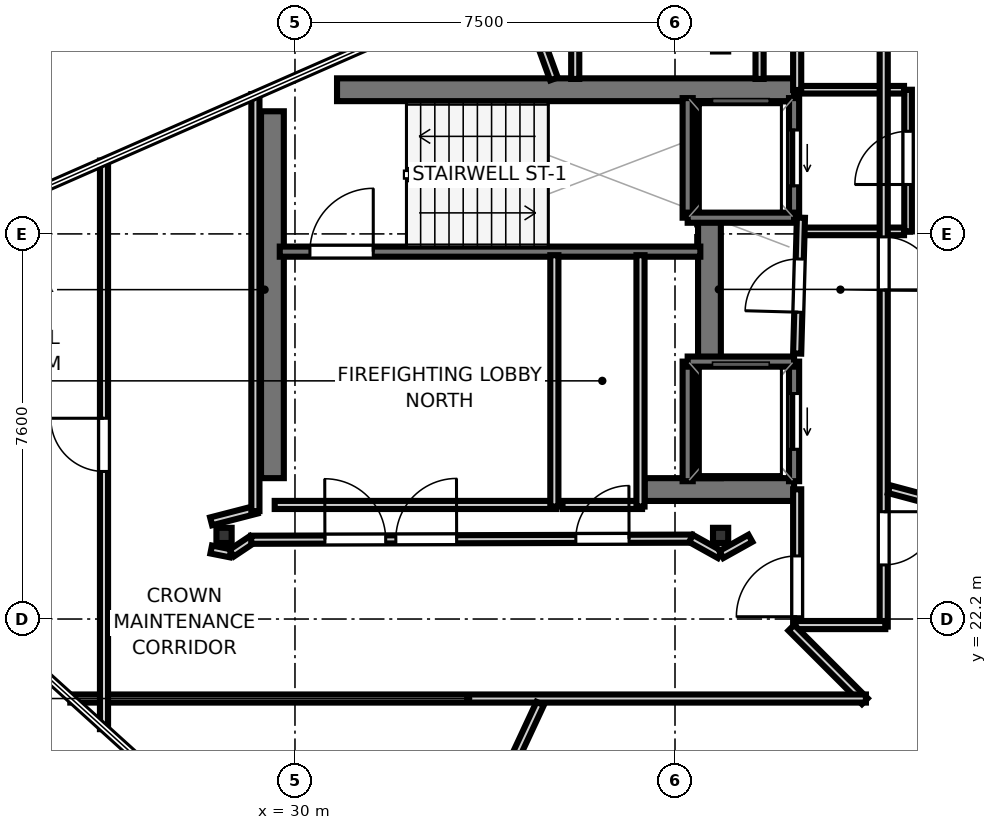
"""IFC4 building model, lengths in metres.
Left out: names, types, materials, properties, quantities, classifications, styles, units other than length and angle.
Written with IfcOpenShell. Run it as: python <this file> out.ifc"""

import sys

from ifc_helpers import new_model, si_unit, direction, frame, frame_2d, origin, origin_2d, place, context, subcontext, project, spatial, rectangle, i_section, extrude, element, fill, save


model = new_model("IFC4")
c1 = context("Model", 3, precision=1e-05, world=origin(), true_north=direction((0.0, 1.0)))
c2 = subcontext(c1, "Body", "Model", "MODEL_VIEW")
j1 = project(units=[si_unit("LENGTHUNIT", "METRE"), si_unit("PLANEANGLEUNIT", "RADIAN")], contexts=[c1])
p1 = place(None, origin())
s1 = spatial("IfcSite", under=j1, at=p1, CompositionType="ELEMENT")
p2 = place(p1, origin())
s2 = spatial("IfcBuilding", under=s1, at=p2, CompositionType="ELEMENT")
p3 = place(p2, frame((0.0, 0.0, 371.3)))
s3 = spatial("IfcBuildingStorey", under=s2, at=p3, CompositionType="ELEMENT", Elevation=371.3)
p4 = place(p3, frame((30.83, 32.645, 0.0), z_axis=(0.0, 0.0, 1.0), x_axis=(1.0, 0.0, 0.0)))
e1 = element("IfcWall", 1, at=p4, inside=s3, PredefinedType="SHEAR", context=c2, shape_type="SweptSolid", body=[
    extrude(rectangle(XDim=9.02, YDim=0.45, at=frame_2d((4.51, 0.0))), origin(), (0.0, 0.0, 1.0), 3.55),
])
p5 = place(p3, frame((36.9, 24.755, 0.0), z_axis=(0.0, 0.0, 1.0), x_axis=(1.0, 0.0, 0.0)))
e2 = element("IfcWall", 2, at=p5, inside=s3, PredefinedType="SHEAR", context=c2, shape_type="SweptSolid", body=[
    extrude(rectangle(XDim=2.95, YDim=0.45, at=frame_2d((1.475, 0.0))), origin(), (0.0, 0.0, 1.0), 3.55),
])
p6 = place(p3, frame((29.555, 24.98, 0.0), z_axis=(0.0, 0.0, 1.0), x_axis=(0.0, 1.0, 0.0)))
e3 = element("IfcWall", 3, at=p6, inside=s3, PredefinedType="SHEAR", context=c2, shape_type="SweptSolid", body=[
    extrude(rectangle(XDim=7.24, YDim=0.45, at=frame_2d((3.62, 0.0))), origin(), (0.0, 0.0, 1.0), 3.55),
])
p7 = place(p3, frame((38.18, 24.98, 0.0), z_axis=(0.0, 0.0, 1.0), x_axis=(0.0, 1.0, 0.0)))
e4 = element("IfcWall", 4, at=p7, inside=s3, PredefinedType="SHEAR", context=c2, shape_type="SweptSolid", body=[
    extrude(rectangle(XDim=7.44, YDim=0.45, at=frame_2d((3.72, 0.0))), origin(), (0.0, 0.0, 1.0), 3.55),
])
for number, where, z_axis, x_axis in (
    (5, (28.6, 23.85, 0.0), (0.0, 0.0, 1.0), (1.0, 0.0, 0.0)),
    (6, (38.4, 23.85, 0.0), (0.0, 0.0, 1.0), (1.0, 0.0, 0.0)),
):
    element("IfcColumn", number, at=place(p3, frame(where, z_axis=z_axis, x_axis=x_axis)), inside=s3, PredefinedType="COLUMN", context=c2, shape_type="SweptSolid", body=[
        extrude(i_section(OverallWidth=0.3, OverallDepth=0.3, WebThickness=0.01, FlangeThickness=0.015, at=origin_2d()), origin(), (0.0, 0.0, 1.0), 3.75),
    ])
p8 = place(p3, frame((29.7, 29.45, 0.0), z_axis=(0.0, 0.0, 1.0), x_axis=(1.0, 0.0, 0.0)))
e7 = element("IfcWall", 7, at=p8, inside=s3, PredefinedType="SOLIDWALL", context=c2, shape_type="SweptSolid", body=[
    extrude(rectangle(XDim=8.3, YDim=0.2, at=frame_2d((4.15, 0.0))), origin(), (0.0, 0.0, 1.0), 3.55),
])
p9 = place(p8, frame((0.595, 0.0, 0.0)))
e8 = element("IfcOpeningElement", 8, at=p9, cuts=e7, PredefinedType="OPENING", context=c2, shape_type="SweptSolid", body=[
    extrude(rectangle(XDim=1.25, YDim=2.15, at=frame_2d((0.625, 1.075))), frame((0.0, 0.11, 0.0), z_axis=(0.0, -1.0, 0.0), x_axis=(1.0, 0.0, 0.0)), (0.0, 0.0, 1.0), 0.22),
])
p10 = place(p3, frame((39.85, 30.12, 0.0), z_axis=(0.0, 0.0, 1.0), x_axis=(0.0, 1.0, 0.0)))
e9 = element("IfcWall", 9, at=p10, inside=s3, PredefinedType="SOLIDWALL", context=c2, shape_type="SweptSolid", body=[
    extrude(rectangle(XDim=2.36, YDim=0.2, at=frame_2d((1.18, 0.0))), origin(), (0.0, 0.0, 1.0), 3.55),
])
p11 = place(p10, frame((0.63, 0.0, 0.0)))
e10 = element("IfcOpeningElement", 10, at=p11, cuts=e9, PredefinedType="OPENING", context=c2, shape_type="SweptSolid", body=[
    extrude(rectangle(XDim=1.1, YDim=2.15, at=frame_2d((0.55, 1.075))), frame((0.0, 0.11, 0.0), z_axis=(0.0, -1.0, 0.0), x_axis=(1.0, 0.0, 0.0)), (0.0, 0.0, 1.0), 0.22),
])
p12 = place(p3, frame((37.75, 30.12, 0.0), z_axis=(0.0, 0.0, 1.0), x_axis=(0.0, 1.0, 0.0)))
e11 = element("IfcWall", 11, at=p12, inside=s3, PredefinedType="SOLIDWALL", context=c2, shape_type="SweptSolid", body=[
    extrude(rectangle(XDim=2.36, YDim=0.2, at=frame_2d((1.18, 0.0))), origin(), (0.0, 0.0, 1.0), 3.55),
])
p13 = place(p3, frame((37.75, 30.12, 0.0), z_axis=(0.0, 0.0, 1.0), x_axis=(1.0, 0.0, 0.0)))
e12 = element("IfcWall", 12, at=p13, inside=s3, PredefinedType="SOLIDWALL", context=c2, shape_type="SweptSolid", body=[
    extrude(rectangle(XDim=2.1, YDim=0.2, at=frame_2d((1.05, 0.0))), origin(), (0.0, 0.0, 1.0), 3.55),
])
p14 = place(p3, frame((39.85, 24.92, 0.0), z_axis=(0.0, 0.0, 1.0), x_axis=(0.0, 1.0, 0.0)))
e13 = element("IfcWall", 13, at=p14, inside=s3, PredefinedType="SOLIDWALL", context=c2, shape_type="SweptSolid", body=[
    extrude(rectangle(XDim=2.36, YDim=0.2, at=frame_2d((1.18, 0.0))), origin(), (0.0, 0.0, 1.0), 3.55),
])
p15 = place(p14, frame((0.63, 0.0, 0.0)))
e14 = element("IfcOpeningElement", 14, at=p15, cuts=e13, PredefinedType="OPENING", context=c2, shape_type="SweptSolid", body=[
    extrude(rectangle(XDim=1.1, YDim=2.15, at=frame_2d((0.55, 1.075))), frame((0.0, 0.11, 0.0), z_axis=(0.0, -1.0, 0.0), x_axis=(1.0, 0.0, 0.0)), (0.0, 0.0, 1.0), 0.22),
])
p16 = place(p3, frame((37.75, 24.92, 0.0), z_axis=(0.0, 0.0, 1.0), x_axis=(0.0, 1.0, 0.0)))
e15 = element("IfcWall", 15, at=p16, inside=s3, PredefinedType="SOLIDWALL", context=c2, shape_type="SweptSolid", body=[
    extrude(rectangle(XDim=2.36, YDim=0.2, at=frame_2d((1.18, 0.0))), origin(), (0.0, 0.0, 1.0), 3.55),
])
p17 = place(p3, frame((37.75, 27.28, 0.0), z_axis=(0.0, 0.0, 1.0), x_axis=(1.0, 0.0, 0.0)))
e16 = element("IfcWall", 16, at=p17, inside=s3, PredefinedType="SOLIDWALL", context=c2, shape_type="SweptSolid", body=[
    extrude(rectangle(XDim=2.1, YDim=0.2, at=frame_2d((1.05, 0.0))), origin(), (0.0, 0.0, 1.0), 3.55),
])
p18 = place(p3, frame((42.1, 29.85, 0.0), z_axis=(0.0, 0.0, 1.0), x_axis=(0.0, 1.0, 0.0)))
e17 = element("IfcWall", 17, at=p18, inside=s3, PredefinedType="PARTITIONING", context=c2, shape_type="SweptSolid", body=[
    extrude(rectangle(XDim=2.795, YDim=0.15, at=frame_2d((1.397, 0.0))), origin(), (0.0, 0.0, 1.0), 2.87),
])
p19 = place(p18, frame((0.925, 0.0, 0.0)))
e18 = element("IfcOpeningElement", 18, at=p19, cuts=e17, PredefinedType="OPENING", context=c2, shape_type="SweptSolid", body=[
    extrude(rectangle(XDim=1.05, YDim=2.15, at=frame_2d((0.525, 1.075))), frame((0.0, 0.085, 0.0), z_axis=(0.0, -1.0, 0.0), x_axis=(1.0, 0.0, 0.0)), (0.0, 0.0, 1.0), 0.17),
])
for number, where, z_axis, x_axis in (
    (19, (39.96, 29.85, 0.0), (0.0, 0.0, 1.0), (1.0, 0.0, 0.0)),
    (20, (39.96, 32.645, 0.0), (0.0, 0.0, 1.0), (1.0, 0.0, 0.0)),
):
    element("IfcWall", number, at=place(p3, frame(where, z_axis=z_axis, x_axis=x_axis)), inside=s3, PredefinedType="PARTITIONING", context=c2, shape_type="SweptSolid", body=[
        extrude(rectangle(XDim=2.06, YDim=0.15, at=frame_2d((1.03, 0.0))), origin(), (0.0, 0.0, 1.0), 2.87),
    ])
p20 = place(p3, frame((35.15, 24.451, 0.0), z_axis=(0.0, 0.0, 1.0), x_axis=(-1.0, 0.0, 0.0)))
e21 = element("IfcWall", 21, at=p20, inside=s3, PredefinedType="PARTITIONING", context=c2, shape_type="SweptSolid", body=[
    extrude(rectangle(XDim=5.55, YDim=0.16, at=frame_2d((2.775, 0.0))), origin(), (0.0, 0.0, 1.0), 2.87),
])
p21 = place(p3, frame((35.119, 29.38, 0.0), z_axis=(0.0, 0.0, 1.0), x_axis=(0.0, -1.0, 0.0)))
e22 = element("IfcWall", 22, at=p21, inside=s3, PredefinedType="PARTITIONING", context=c2, shape_type="SweptSolid", body=[
    extrude(rectangle(XDim=4.96, YDim=0.16, at=frame_2d((2.48, 0.0))), origin(), (0.0, 0.0, 1.0), 2.08),
])
p22 = place(p3, frame((39.911, 22.05, 0.0), z_axis=(0.0, 0.0, 1.0), x_axis=(0.0, 1.0, 0.0)))
e23 = element("IfcWall", 23, at=p22, inside=s3, PredefinedType="PARTITIONING", context=c2, shape_type="SweptSolid", body=[
    extrude(rectangle(XDim=2.71, YDim=0.16, at=frame_2d((1.355, 0.0))), origin(), (0.0, 0.0, 1.0), 2.87),
])
p23 = place(p22, frame((0.195, 0.0, 0.0)))
e24 = element("IfcOpeningElement", 24, at=p23, cuts=e23, PredefinedType="OPENING", context=c2, shape_type="SweptSolid", body=[
    extrude(rectangle(XDim=1.2, YDim=2.15, at=frame_2d((0.6, 1.075))), frame((0.0, 0.09, 0.0), z_axis=(0.0, -1.0, 0.0), x_axis=(1.0, 0.0, 0.0)), (0.0, 0.0, 1.0), 0.18),
])
p24 = place(p3, frame((39.911, 27.439, 0.0), z_axis=(0.0, 0.0, 1.0), x_axis=(0.027673579092, 0.999617013171, 0.0)))
e25 = element("IfcWall", 25, at=p24, inside=s3, PredefinedType="PARTITIONING", context=c2, shape_type="SweptSolid", body=[
    extrude(rectangle(XDim=2.682, YDim=0.16, at=frame_2d((1.341, 0.0))), origin(), (0.0, 0.0, 1.0), 2.87),
])
p25 = place(p24, frame((0.816, 0.0, 0.0)))
e26 = element("IfcOpeningElement", 26, at=p25, cuts=e25, PredefinedType="OPENING", context=c2, shape_type="SweptSolid", body=[
    extrude(rectangle(XDim=1.05, YDim=2.15, at=frame_2d((0.525, 1.075))), frame((0.0, 0.09, 0.0), z_axis=(0.0, -1.0, 0.0), x_axis=(1.0, 0.0, 0.0)), (0.0, 0.0, 1.0), 0.18),
])
p26 = place(p3, frame((39.911, 32.64, 0.0), z_axis=(0.0, 0.0, 1.0), x_axis=(0.0, 1.0, 0.0)))
e27 = element("IfcWall", 27, at=p26, inside=s3, PredefinedType="PARTITIONING", context=c2, shape_type="SweptSolid", body=[
    extrude(rectangle(XDim=2.16, YDim=0.16, at=frame_2d((1.08, 0.0))), origin(), (0.0, 0.0, 1.0), 2.87),
])
p27 = place(p3, frame((41.619, 34.8, 0.0), z_axis=(0.0, 0.0, 1.0), x_axis=(0.0, -1.0, 0.0)))
e28 = element("IfcWall", 28, at=p27, inside=s3, PredefinedType="PARTITIONING", context=c2, shape_type="SweptSolid", body=[
    extrude(rectangle(XDim=12.75, YDim=0.16, at=frame_2d((6.375, 0.0))), origin(), (0.0, 0.0, 1.0), 2.87),
])
p28 = place(p27, frame((10.482, 0.0, 0.0)))
e29 = element("IfcOpeningElement", 29, at=p28, cuts=e28, PredefinedType="OPENING", context=c2, shape_type="SweptSolid", body=[
    extrude(rectangle(XDim=1.05, YDim=2.15, at=frame_2d((0.525, 1.075))), frame((0.0, 0.09, 0.0), z_axis=(0.0, -1.0, 0.0), x_axis=(1.0, 0.0, 0.0)), (0.0, 0.0, 1.0), 0.18),
])
p29 = place(p27, frame((5.059, 0.0, 0.0)))
e30 = element("IfcOpeningElement", 30, at=p29, cuts=e28, PredefinedType="OPENING", context=c2, shape_type="SweptSolid", body=[
    extrude(rectangle(XDim=1.05, YDim=2.15, at=frame_2d((0.525, 1.075))), frame((0.0, 0.09, 0.0), z_axis=(0.0, -1.0, 0.0), x_axis=(1.0, 0.0, 0.0)), (0.0, 0.0, 1.0), 0.18),
])
p30 = place(p3, frame((41.65, 22.081, 0.0), z_axis=(0.0, 0.0, 1.0), x_axis=(-1.0, 0.0, 0.0)))
e31 = element("IfcWall", 31, at=p30, inside=s3, PredefinedType="PARTITIONING", context=c2, shape_type="SweptSolid", body=[
    extrude(rectangle(XDim=1.77, YDim=0.16, at=frame_2d((0.885, 0.0))), origin(), (0.0, 0.0, 1.0), 2.87),
])
p31 = place(p3, frame((36.85, 24.451, 0.0), z_axis=(0.0, 0.0, 1.0), x_axis=(-1.0, 0.0, 0.0)))
e32 = element("IfcWall", 32, at=p31, inside=s3, PredefinedType="PARTITIONING", context=c2, shape_type="SweptSolid", body=[
    extrude(rectangle(XDim=1.57, YDim=0.16, at=frame_2d((0.785, 0.0))), origin(), (0.0, 0.0, 1.0), 2.87),
])
p32 = place(p3, frame((36.819, 29.38, 0.0), z_axis=(0.0, 0.0, 1.0), x_axis=(0.0, -1.0, 0.0)))
e33 = element("IfcWall", 33, at=p32, inside=s3, PredefinedType="PARTITIONING", context=c2, shape_type="SweptSolid", body=[
    extrude(rectangle(XDim=4.96, YDim=0.16, at=frame_2d((2.48, 0.0))), origin(), (0.0, 0.0, 1.0), 2.87),
])
p33 = place(p3, frame((35.531, 32.858, 0.0), z_axis=(0.0, 0.0, 1.0), x_axis=(0.0, 1.0, 0.0)))
e34 = element("IfcWall", 34, at=p33, inside=s3, PredefinedType="PARTITIONING", context=c2, shape_type="SweptSolid", body=[
    extrude(rectangle(XDim=2.474, YDim=0.16, at=frame_2d((1.237, 0.0))), origin(), (0.0, 0.0, 1.0), 2.87),
])
p34 = place(p3, frame((39.169, 35.1, 0.0), z_axis=(0.0, 0.0, 1.0), x_axis=(0.0, -1.0, 0.0)))
e35 = element("IfcWall", 35, at=p34, inside=s3, PredefinedType="PARTITIONING", context=c2, shape_type="SweptSolid", body=[
    extrude(rectangle(XDim=2.242, YDim=0.16, at=frame_2d((1.121, 0.0))), origin(), (0.0, 0.0, 1.0), 2.87),
])
p35 = place(p3, frame((29.242, 24.359, 0.0), z_axis=(0.0, 0.0, 1.0), x_axis=(-0.968190928123, -0.250212563035, 0.0)))
e36 = element("IfcWall", 36, at=p35, inside=s3, PredefinedType="PARTITIONING", context=c2, shape_type="SweptSolid", body=[
    extrude(rectangle(XDim=0.927, YDim=0.16, at=frame_2d((0.463, 0.0))), origin(), (0.0, 0.0, 1.0), 2.87),
])
p36 = place(p3, frame((28.346, 23.572, 0.0), z_axis=(0.0, 0.0, 1.0), x_axis=(0.980749356168, -0.19527083852, 0.0)))
e37 = element("IfcWall", 37, at=p36, inside=s3, PredefinedType="PARTITIONING", context=c2, shape_type="SweptSolid", body=[
    extrude(rectangle(XDim=0.389, YDim=0.16, at=frame_2d((0.194, 0.0))), origin(), (0.0, 0.0, 1.0), 2.87),
])
p37 = place(p3, frame((28.751, 23.501, 0.0), z_axis=(0.0, 0.0, 1.0), x_axis=(0.831506528289, 0.555514980368, 0.0)))
e38 = element("IfcWall", 38, at=p37, inside=s3, PredefinedType="PARTITIONING", context=c2, shape_type="SweptSolid", body=[
    extrude(rectangle(XDim=0.484, YDim=0.16, at=frame_2d((0.242, 0.0))), origin(), (0.0, 0.0, 1.0), 2.87),
])
p38 = place(p3, frame((29.136, 23.764, 0.0), z_axis=(0.0, 0.0, 1.0), x_axis=(0.999996877471, 0.002499009437, 0.0)))
e39 = element("IfcWall", 39, at=p38, inside=s3, PredefinedType="PARTITIONING", context=c2, shape_type="SweptSolid", body=[
    extrude(rectangle(XDim=8.695, YDim=0.16, at=frame_2d((4.347, 0.0))), origin(), (0.0, 0.0, 1.0), 2.87),
])
p39 = place(p38, frame((2.854, 0.0, 0.0)))
e40 = element("IfcOpeningElement", 40, at=p39, cuts=e39, PredefinedType="OPENING", context=c2, shape_type="SweptSolid", body=[
    extrude(rectangle(XDim=1.2, YDim=2.15, at=frame_2d((0.6, 1.075))), frame((0.0, 0.09, 0.0), z_axis=(0.0, -1.0, 0.0), x_axis=(1.0, 0.0, 0.0)), (0.0, 0.0, 1.0), 0.18),
])
p40 = place(p38, frame((6.407, 0.0, 0.0)))
e41 = element("IfcOpeningElement", 41, at=p40, cuts=e39, PredefinedType="OPENING", context=c2, shape_type="SweptSolid", body=[
    extrude(rectangle(XDim=1.05, YDim=2.15, at=frame_2d((0.525, 1.075))), frame((0.0, 0.09, 0.0), z_axis=(0.0, -1.0, 0.0), x_axis=(1.0, 0.0, 0.0)), (0.0, 0.0, 1.0), 0.18),
])
p41 = place(p38, frame((1.454, 0.0, 0.0)))
e42 = element("IfcOpeningElement", 42, at=p41, cuts=e39, PredefinedType="OPENING", context=c2, shape_type="SweptSolid", body=[
    extrude(rectangle(XDim=1.2, YDim=2.15, at=frame_2d((0.6, 1.075))), frame((0.0, 0.09, 0.0), z_axis=(0.0, -1.0, 0.0), x_axis=(1.0, 0.0, 0.0)), (0.0, 0.0, 1.0), 0.18),
])
p42 = place(p3, frame((37.816, 23.79, 0.0), z_axis=(0.0, 0.0, 1.0), x_axis=(0.873431330758, -0.486947338478, 0.0)))
e43 = element("IfcWall", 43, at=p42, inside=s3, PredefinedType="PARTITIONING", context=c2, shape_type="SweptSolid", body=[
    extrude(rectangle(XDim=0.651, YDim=0.16, at=frame_2d((0.326, 0.0))), origin(), (0.0, 0.0, 1.0), 2.87),
])
p43 = place(p3, frame((38.415, 23.473, 0.0), z_axis=(0.0, 0.0, 1.0), x_axis=(0.873120406102, 0.487504621976, 0.0)))
e44 = element("IfcWall", 44, at=p43, inside=s3, PredefinedType="PARTITIONING", context=c2, shape_type="SweptSolid", body=[
    extrude(rectangle(XDim=0.656, YDim=0.16, at=frame_2d((0.328, 0.0))), origin(), (0.0, 0.0, 1.0), 2.87),
])
p44 = place(p3, frame((39.796, 22.028, 0.0), z_axis=(0.0, 0.0, 1.0), x_axis=(0.707106781187, -0.707106781187, 0.0)))
e45 = element("IfcWall", 45, at=p44, inside=s3, PredefinedType="PARTITIONING", context=c2, shape_type="SweptSolid", body=[
    extrude(rectangle(XDim=2.051, YDim=0.16, at=frame_2d((1.025, 0.0))), origin(), (0.0, 0.0, 1.0), 2.87),
])
p45 = place(p3, frame((41.268, 20.631, 0.0), z_axis=(0.0, 0.0, 1.0), x_axis=(-1.0, 0.0, 0.0)))
e46 = element("IfcWall", 46, at=p45, inside=s3, PredefinedType="PARTITIONING", context=c2, shape_type="SweptSolid", body=[
    extrude(rectangle(XDim=15.702, YDim=0.16, at=frame_2d((7.851, 0.0))), origin(), (0.0, 0.0, 1.0), 2.87),
])
p46 = place(p3, frame((26.231, 20.027, 0.0), z_axis=(0.0, 0.0, 1.0), x_axis=(0.0, 1.0, 0.0)))
e47 = element("IfcWall", 47, at=p46, inside=s3, PredefinedType="PARTITIONING", context=c2, shape_type="SweptSolid", body=[
    extrude(rectangle(XDim=11.22, YDim=0.16, at=frame_2d((5.61, 0.0))), origin(), (0.0, 0.0, 1.0), 2.87),
])
p47 = place(p46, frame((5.085, 0.0, 0.0)))
e48 = element("IfcOpeningElement", 48, at=p47, cuts=e47, PredefinedType="OPENING", context=c2, shape_type="SweptSolid", body=[
    extrude(rectangle(XDim=1.05, YDim=2.15, at=frame_2d((0.525, 1.075))), frame((0.0, 0.09, 0.0), z_axis=(0.0, -1.0, 0.0), x_axis=(1.0, 0.0, 0.0)), (0.0, 0.0, 1.0), 0.18),
])
p48 = place(p3, frame((29.219, 32.56, 0.0), z_axis=(0.0, 0.0, 1.0), x_axis=(0.0, -1.0, 0.0)))
e49 = element("IfcWall", 49, at=p48, inside=s3, PredefinedType="PARTITIONING", context=c2, shape_type="SweptSolid", body=[
    extrude(rectangle(XDim=8.23, YDim=0.16, at=frame_2d((4.115, 0.0))), origin(), (0.0, 0.0, 1.0), 2.87),
])
p49 = place(p3, frame((34.839, 20.533, 0.0), z_axis=(0.0, 0.0, 1.0), x_axis=(-0.4226199914, -0.906306980481, 0.0)))
e50 = element("IfcWall", 50, at=p49, inside=s3, PredefinedType="PARTITIONING", context=c2, shape_type="SweptSolid", body=[
    extrude(rectangle(XDim=6.445, YDim=0.16, at=frame_2d((3.222, 0.0))), origin(), (0.0, 0.0, 1.0), 2.87),
])
p50 = place(p3, frame((41.722, 24.764, 0.0), z_axis=(0.0, 0.0, 1.0), x_axis=(0.965929963901, -0.258803602832, 0.0)))
e51 = element("IfcWall", 51, at=p50, inside=s3, PredefinedType="PARTITIONING", context=c2, shape_type="SweptSolid", body=[
    extrude(rectangle(XDim=4.94, YDim=0.16, at=frame_2d((2.47, 0.0))), origin(), (0.0, 0.0, 1.0), 2.87),
])
p51 = place(p3, frame((35.111, 32.858, 0.0), z_axis=(0.0, 0.0, 1.0), x_axis=(-0.342060015432, 0.939678107568, 0.0)))
e52 = element("IfcWall", 52, at=p51, inside=s3, PredefinedType="PARTITIONING", context=c2, shape_type="SweptSolid", body=[
    extrude(rectangle(XDim=2.103, YDim=0.16, at=frame_2d((1.051, 0.0))), origin(), (0.0, 0.0, 1.0), 2.87),
])
p52 = place(p9, origin())
e53 = element("IfcDoor", 53, at=p52, inside=s3, OperationType="SINGLE_SWING_RIGHT", PredefinedType="DOOR", context=c2, shape_type="SweptSolid", body=[
    extrude(rectangle(XDim=1.25, YDim=2.15, at=frame_2d((0.625, 1.075))), frame((0.0, 0.025, 0.0), z_axis=(0.0, -1.0, 0.0), x_axis=(1.0, 0.0, 0.0)), (0.0, 0.0, 1.0), 0.05),
])
fill(e8, e53)
p53 = place(p11, origin())
e54 = element("IfcDoor", 54, at=p53, inside=s3, OperationType="SLIDING_TO_LEFT", PredefinedType="DOOR", context=c2, shape_type="SweptSolid", body=[
    extrude(rectangle(XDim=1.1, YDim=2.15, at=frame_2d((0.55, 1.075))), frame((0.0, 0.025, 0.0), z_axis=(0.0, -1.0, 0.0), x_axis=(1.0, 0.0, 0.0)), (0.0, 0.0, 1.0), 0.05),
])
fill(e10, e54)
p54 = place(p15, origin())
e55 = element("IfcDoor", 55, at=p54, inside=s3, OperationType="SLIDING_TO_LEFT", PredefinedType="DOOR", context=c2, shape_type="SweptSolid", body=[
    extrude(rectangle(XDim=1.1, YDim=2.15, at=frame_2d((0.55, 1.075))), frame((0.0, 0.025, 0.0), z_axis=(0.0, -1.0, 0.0), x_axis=(1.0, 0.0, 0.0)), (0.0, 0.0, 1.0), 0.05),
])
fill(e14, e55)
p55 = place(p19, origin())
e56 = element("IfcDoor", 56, at=p55, inside=s3, OperationType="SINGLE_SWING_LEFT", PredefinedType="DOOR", context=c2, shape_type="SweptSolid", body=[
    extrude(rectangle(XDim=1.05, YDim=2.15, at=frame_2d((0.525, 1.075))), frame((0.0, 0.025, 0.0), z_axis=(0.0, -1.0, 0.0), x_axis=(1.0, 0.0, 0.0)), (0.0, 0.0, 1.0), 0.05),
])
fill(e18, e56)
p56 = place(p39, origin())
e57 = element("IfcDoor", 57, at=p56, inside=s3, OperationType="SINGLE_SWING_RIGHT", PredefinedType="DOOR", context=c2, shape_type="SweptSolid", body=[
    extrude(rectangle(XDim=1.2, YDim=2.15, at=frame_2d((0.6, 1.075))), frame((0.0, 0.025, 0.0), z_axis=(0.0, -1.0, 0.0), x_axis=(1.0, 0.0, 0.0)), (0.0, 0.0, 1.0), 0.05),
])
fill(e40, e57)
p57 = place(p23, origin())
e58 = element("IfcDoor", 58, at=p57, inside=s3, OperationType="SINGLE_SWING_LEFT", PredefinedType="DOOR", context=c2, shape_type="SweptSolid", body=[
    extrude(rectangle(XDim=1.2, YDim=2.15, at=frame_2d((0.6, 1.075))), frame((0.0, 0.025, 0.0), z_axis=(0.0, -1.0, 0.0), x_axis=(1.0, 0.0, 0.0)), (0.0, 0.0, 1.0), 0.05),
])
fill(e24, e58)
p58 = place(p40, origin())
e59 = element("IfcDoor", 59, at=p58, inside=s3, OperationType="SINGLE_SWING_RIGHT", PredefinedType="DOOR", context=c2, shape_type="SweptSolid", body=[
    extrude(rectangle(XDim=1.05, YDim=2.15, at=frame_2d((0.525, 1.075))), frame((0.0, 0.025, 0.0), z_axis=(0.0, -1.0, 0.0), x_axis=(1.0, 0.0, 0.0)), (0.0, 0.0, 1.0), 0.05),
])
fill(e41, e59)
p59 = place(p41, origin())
e60 = element("IfcDoor", 60, at=p59, inside=s3, OperationType="SINGLE_SWING_LEFT", PredefinedType="DOOR", context=c2, shape_type="SweptSolid", body=[
    extrude(rectangle(XDim=1.2, YDim=2.15, at=frame_2d((0.6, 1.075))), frame((0.0, 0.025, 0.0), z_axis=(0.0, -1.0, 0.0), x_axis=(1.0, 0.0, 0.0)), (0.0, 0.0, 1.0), 0.05),
])
fill(e42, e60)
p60 = place(p47, origin())
e61 = element("IfcDoor", 61, at=p60, inside=s3, OperationType="SINGLE_SWING_RIGHT", PredefinedType="DOOR", context=c2, shape_type="SweptSolid", body=[
    extrude(rectangle(XDim=1.05, YDim=2.15, at=frame_2d((0.525, 1.075))), frame((0.0, 0.025, 0.0), z_axis=(0.0, -1.0, 0.0), x_axis=(1.0, 0.0, 0.0)), (0.0, 0.0, 1.0), 0.05),
])
fill(e48, e61)
p61 = place(p28, origin())
e62 = element("IfcDoor", 62, at=p61, inside=s3, OperationType="SINGLE_SWING_LEFT", PredefinedType="DOOR", context=c2, shape_type="SweptSolid", body=[
    extrude(rectangle(XDim=1.05, YDim=2.15, at=frame_2d((0.525, 1.075))), frame((0.0, 0.025, 0.0), z_axis=(0.0, -1.0, 0.0), x_axis=(1.0, 0.0, 0.0)), (0.0, 0.0, 1.0), 0.05),
])
fill(e29, e62)
p62 = place(p29, origin())
e63 = element("IfcDoor", 63, at=p62, inside=s3, OperationType="SINGLE_SWING_RIGHT", PredefinedType="DOOR", context=c2, shape_type="SweptSolid", body=[
    extrude(rectangle(XDim=1.05, YDim=2.15, at=frame_2d((0.525, 1.075))), frame((0.0, 0.025, 0.0), z_axis=(0.0, -1.0, 0.0), x_axis=(1.0, 0.0, 0.0)), (0.0, 0.0, 1.0), 0.05),
])
fill(e30, e63)
p63 = place(p25, origin())
e64 = element("IfcDoor", 64, at=p63, inside=s3, OperationType="SINGLE_SWING_LEFT", PredefinedType="DOOR", context=c2, shape_type="SweptSolid", body=[
    extrude(rectangle(XDim=1.05, YDim=2.15, at=frame_2d((0.525, 1.075))), frame((0.0, 0.025, 0.0), z_axis=(0.0, -1.0, 0.0), x_axis=(1.0, 0.0, 0.0)), (0.0, 0.0, 1.0), 0.05),
])
fill(e26, e64)
save(model, sys.argv[1])
